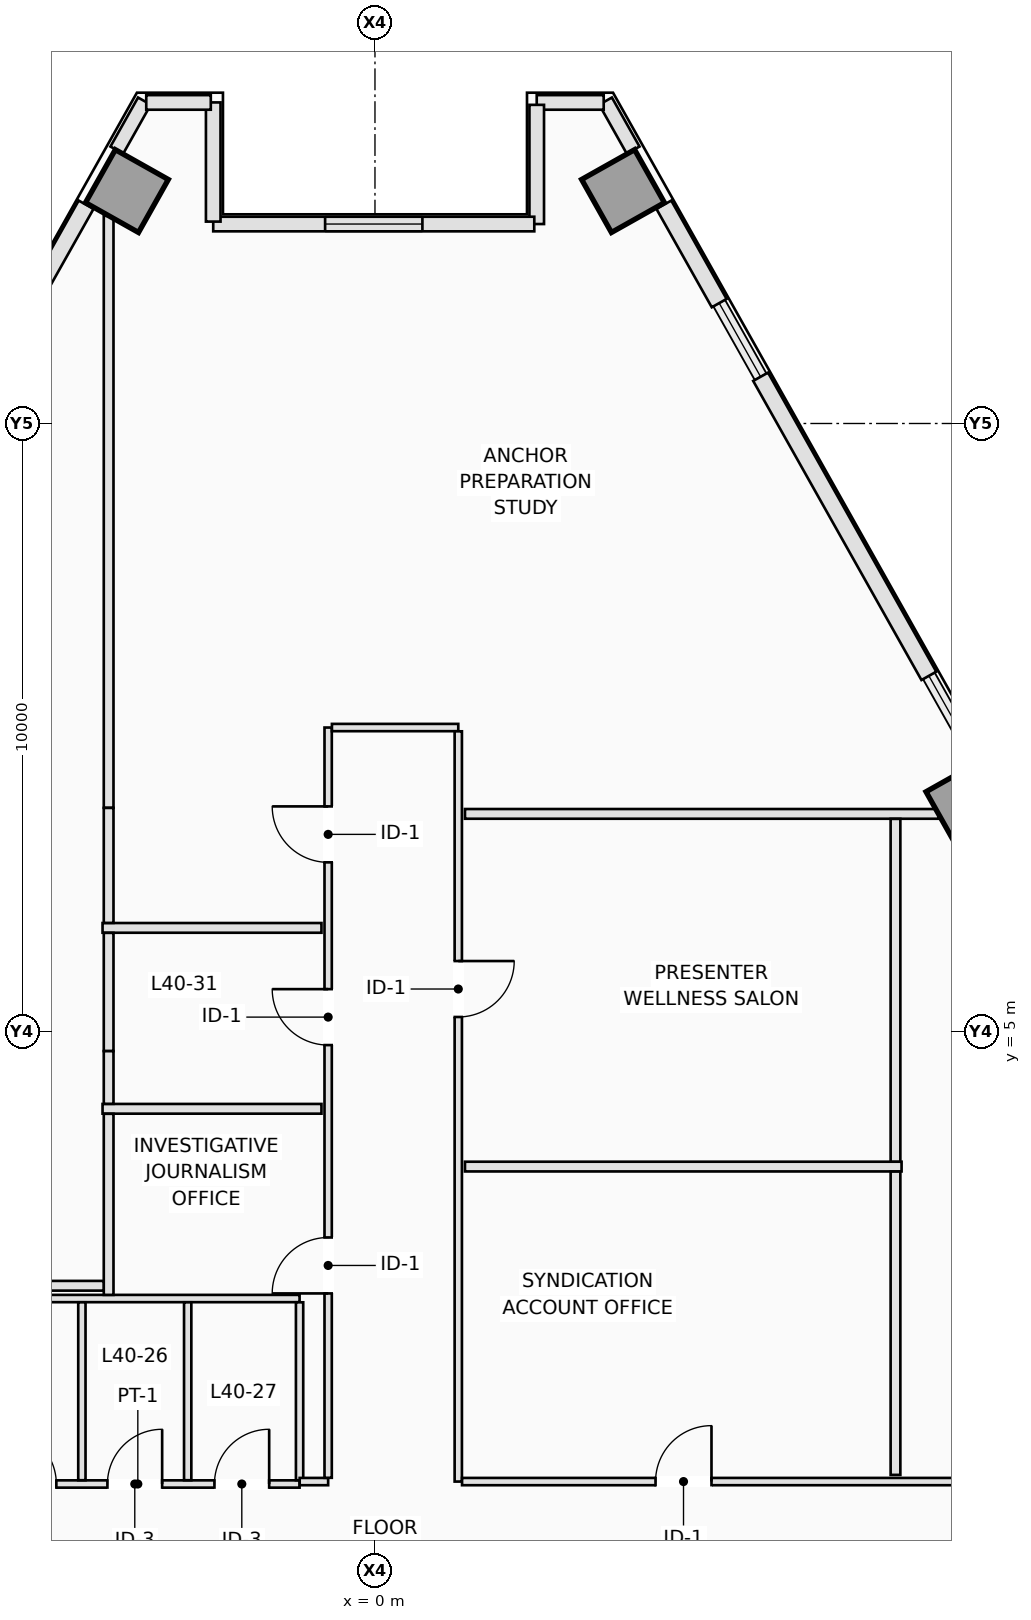
"""IFC4 building model, lengths in metres.
Left out: names, types, materials, properties, quantities, classifications, styles, units other than length and angle.
Written with IfcOpenShell. Run it as: python <this file> out.ifc"""

import sys

from ifc_helpers import new_model, si_unit, direction, frame, frame_2d, origin, origin_2d, place, context, subcontext, project, spatial, rectangle, extrude, element, fill, save


model = new_model("IFC4")
c1 = context("Model", 3, precision=1e-05, world=origin(), true_north=direction((0.0, 1.0)))
c2 = subcontext(c1, "Body", "Model", "MODEL_VIEW")
j1 = project(units=[si_unit("LENGTHUNIT", "METRE"), si_unit("PLANEANGLEUNIT", "RADIAN")], contexts=[c1])
p1 = place(None, origin())
s1 = spatial("IfcSite", under=j1, at=p1, CompositionType="ELEMENT")
p2 = place(p1, origin())
s2 = spatial("IfcBuilding", under=s1, at=p2, CompositionType="ELEMENT")
p3 = place(p2, frame((0.0, 0.0, 147.5)))
s3 = spatial("IfcBuildingStorey", under=s2, at=p3, CompositionType="ELEMENT", Elevation=147.5)
for number, where, z_axis, x_axis in (
    (1, (9.743, 8.753, 0.0), (0.0, 0.0, 1.0), (0.872, 0.49, 0.0)),
    (2, (4.079, 18.822, 0.0), (0.0, 0.0, 1.0), (0.872, 0.49, 0.0)),
    (3, (-4.079, 18.822, 0.0), (0.0, 0.0, 1.0), (-0.872, 0.49, 0.0)),
):
    element("IfcColumn", number, at=place(p3, frame(where, z_axis=z_axis, x_axis=x_axis)), inside=s3, PredefinedType="COLUMN", context=c2, shape_type="SweptSolid", body=[
        extrude(rectangle(XDim=1.0, YDim=1.0, at=origin_2d()), origin(), (0.0, 0.0, 1.0), 3.5),
    ])
p4 = place(p3, frame((3.792, 20.302, 0.0), z_axis=(0.0, 0.0, 1.0), x_axis=(0.490048346303, -0.871695255399, 0.0)))
e4 = element("IfcWall", 4, at=p4, inside=s3, PredefinedType="STANDARD", context=c2, shape_type="SweptSolid", body=[
    extrude(rectangle(XDim=0.926, YDim=0.24, at=frame_2d((0.463, 0.0))), origin(), (0.0, 0.0, 1.0), 3.25),
])
p5 = place(p3, frame((4.751, 18.597, 0.0), z_axis=(0.0, 0.0, 1.0), x_axis=(0.490248749158, -0.871582562899, 0.0)))
e5 = element("IfcWall", 5, at=p5, inside=s3, PredefinedType="STANDARD", context=c2, shape_type="SweptSolid", body=[
    extrude(rectangle(XDim=1.856, YDim=0.28, at=frame_2d((0.928, 0.0))), origin(), (0.0, 0.0, 1.0), 3.25),
])
p6 = place(p3, frame((6.342, 15.768, 0.0), z_axis=(0.0, 0.0, 1.0), x_axis=(0.490289995219, -0.871559361483, 0.0)))
e6 = element("IfcWall", 6, at=p6, inside=s3, PredefinedType="STANDARD", context=c2, shape_type="SweptSolid", body=[
    extrude(rectangle(XDim=5.643, YDim=0.28, at=frame_2d((2.822, 0.0))), origin(), (0.0, 0.0, 1.0), 3.25),
])
p7 = place(p3, frame((-4.246, 19.495, 0.0), z_axis=(0.0, 0.0, 1.0), x_axis=(0.490048346303, 0.871695255399, 0.0)))
e7 = element("IfcWall", 7, at=p7, inside=s3, PredefinedType="STANDARD", context=c2, shape_type="SweptSolid", body=[
    extrude(rectangle(XDim=0.926, YDim=0.24, at=frame_2d((0.463, 0.0))), origin(), (0.0, 0.0, 1.0), 3.25),
])
p8 = place(p3, frame((-5.661, 16.98, 0.0), z_axis=(0.0, 0.0, 1.0), x_axis=(0.490248749158, 0.871582562899, 0.0)))
e8 = element("IfcWall", 8, at=p8, inside=s3, PredefinedType="STANDARD", context=c2, shape_type="SweptSolid", body=[
    extrude(rectangle(XDim=1.856, YDim=0.28, at=frame_2d((0.928, 0.0))), origin(), (0.0, 0.0, 1.0), 3.25),
])
p9 = place(p3, frame((3.761, 20.28, 0.0), z_axis=(0.0, 0.0, 1.0), x_axis=(-1.0, 0.0, 0.0)))
e9 = element("IfcWall", 9, at=p9, inside=s3, PredefinedType="STANDARD", context=c2, shape_type="SweptSolid", body=[
    extrude(rectangle(XDim=1.102, YDim=0.24, at=frame_2d((0.551, 0.0))), origin(), (0.0, 0.0, 1.0), 3.25),
])
p10 = place(p3, frame((2.66, 20.24, 0.0), z_axis=(0.0, 0.0, 1.0), x_axis=(0.0, -1.0, 0.0)))
e10 = element("IfcWall", 10, at=p10, inside=s3, PredefinedType="STANDARD", context=c2, shape_type="SweptSolid", body=[
    extrude(rectangle(XDim=1.96, YDim=0.24, at=frame_2d((0.98, 0.0))), origin(), (0.0, 0.0, 1.0), 3.25),
])
p11 = place(p3, frame((2.62, 18.28, 0.0), z_axis=(0.0, 0.0, 1.0), x_axis=(-1.0, 0.0, 0.0)))
e11 = element("IfcWall", 11, at=p11, inside=s3, PredefinedType="STANDARD", context=c2, shape_type="SweptSolid", body=[
    extrude(rectangle(XDim=5.28, YDim=0.24, at=frame_2d((2.64, 0.0))), origin(), (0.0, 0.0, 1.0), 3.25),
])
p12 = place(p11, frame((1.84, 0.0, 0.9)))
e12 = element("IfcOpeningElement", 12, at=p12, cuts=e11, PredefinedType="OPENING", context=c2, shape_type="SweptSolid", body=[
    extrude(rectangle(XDim=1.6, YDim=2.1, at=frame_2d((0.8, 1.05))), frame((0.0, 0.13, 0.0), z_axis=(0.0, -1.0, 0.0), x_axis=(1.0, 0.0, 0.0)), (0.0, 0.0, 1.0), 0.26),
])
p13 = place(p3, frame((-2.66, 18.32, 0.0), z_axis=(0.0, 0.0, 1.0), x_axis=(0.0, 1.0, 0.0)))
e13 = element("IfcWall", 13, at=p13, inside=s3, PredefinedType="STANDARD", context=c2, shape_type="SweptSolid", body=[
    extrude(rectangle(XDim=1.96, YDim=0.24, at=frame_2d((0.98, 0.0))), origin(), (0.0, 0.0, 1.0), 3.25),
])
p14 = place(p3, frame((-2.7, 20.28, 0.0), z_axis=(0.0, 0.0, 1.0), x_axis=(-1.0, 0.0, 0.0)))
e14 = element("IfcWall", 14, at=p14, inside=s3, PredefinedType="STANDARD", context=c2, shape_type="SweptSolid", body=[
    extrude(rectangle(XDim=1.062, YDim=0.24, at=frame_2d((0.531, 0.0))), origin(), (0.0, 0.0, 1.0), 3.25),
])
p15 = place(p3, frame((-6.56, -2.44, 0.0), z_axis=(0.0, 0.0, 1.0), x_axis=(1.0, 0.0, 0.0)))
e15 = element("IfcWall", 15, at=p15, inside=s3, PredefinedType="PARTITIONING", context=c2, shape_type="SweptSolid", body=[
    extrude(rectangle(XDim=5.32, YDim=0.12, at=frame_2d((2.66, 0.0))), origin(), (0.0, 0.0, 1.0), 2.891),
])
p16 = place(p15, frame((0.42, 0.0, 0.0)))
e16 = element("IfcOpeningElement", 16, at=p16, cuts=e15, PredefinedType="OPENING", context=c2, shape_type="SweptSolid", body=[
    extrude(rectangle(XDim=0.9, YDim=2.12, at=frame_2d((0.45, 1.06))), frame((0.0, 0.07, 0.0), z_axis=(0.0, -1.0, 0.0), x_axis=(1.0, 0.0, 0.0)), (0.0, 0.0, 1.0), 0.14),
])
p17 = place(p15, frame((2.16, 0.0, 0.0)))
e17 = element("IfcOpeningElement", 17, at=p17, cuts=e15, PredefinedType="OPENING", context=c2, shape_type="SweptSolid", body=[
    extrude(rectangle(XDim=0.9, YDim=2.12, at=frame_2d((0.45, 1.06))), frame((0.0, 0.07, 0.0), z_axis=(0.0, -1.0, 0.0), x_axis=(1.0, 0.0, 0.0)), (0.0, 0.0, 1.0), 0.14),
])
p18 = place(p15, frame((3.92, 0.0, 0.0)))
e18 = element("IfcOpeningElement", 18, at=p18, cuts=e15, PredefinedType="OPENING", context=c2, shape_type="SweptSolid", body=[
    extrude(rectangle(XDim=0.9, YDim=2.12, at=frame_2d((0.45, 1.06))), frame((0.0, 0.07, 0.0), z_axis=(0.0, -1.0, 0.0), x_axis=(1.0, 0.0, 0.0)), (0.0, 0.0, 1.0), 0.14),
])
p19 = place(p3, frame((-6.56, 0.61, 0.0), z_axis=(0.0, 0.0, 1.0), x_axis=(1.0, 0.0, 0.0)))
e19 = element("IfcWall", 19, at=p19, inside=s3, PredefinedType="PARTITIONING", context=c2, shape_type="SweptSolid", body=[
    extrude(rectangle(XDim=5.32, YDim=0.12, at=frame_2d((2.66, 0.0))), origin(), (0.0, 0.0, 1.0), 3.25),
])
for number, where, z_axis, x_axis in (
    (20, (-4.82, -2.378, 0.0), (0.0, 0.0, 1.0), (0.0, 1.0, 0.0)),
    (21, (-3.08, -2.378, 0.0), (0.0, 0.0, 1.0), (0.0, 1.0, 0.0)),
    (22, (-1.24, -2.378, 0.0), (0.0, 0.0, 1.0), (0.0, 1.0, 0.0)),
):
    element("IfcWall", number, at=place(p3, frame(where, z_axis=z_axis, x_axis=x_axis)), inside=s3, PredefinedType="PARTITIONING", context=c2, shape_type="SweptSolid", body=[
        extrude(rectangle(XDim=2.926, YDim=0.12, at=frame_2d((1.463, 0.0))), origin(), (0.0, 0.0, 1.0), 3.25),
    ])
p20 = place(p3, frame((-1.238, -2.4, 0.0), z_axis=(0.0, 0.0, 1.0), x_axis=(1.0, 0.0, 0.0)))
e23 = element("IfcWall", 23, at=p20, inside=s3, PredefinedType="PARTITIONING", context=c2, shape_type="SweptSolid", body=[
    extrude(rectangle(XDim=0.468, YDim=0.12, at=frame_2d((0.234, 0.0))), origin(), (0.0, 0.0, 1.0), 2.891),
])
p21 = place(p3, frame((-0.77, -2.338, 0.0), z_axis=(0.0, 0.0, 1.0), x_axis=(0.0, 1.0, 0.0)))
e24 = element("IfcWall", 24, at=p21, inside=s3, PredefinedType="PARTITIONING", context=c2, shape_type="SweptSolid", body=[
    extrude(rectangle(XDim=12.338, YDim=0.12, at=frame_2d((6.169, 0.0))), origin(), (0.0, 0.0, 1.0), 3.25),
])
p22 = place(p21, frame((10.121, 0.0, 0.0)))
e25 = element("IfcOpeningElement", 25, at=p22, cuts=e24, PredefinedType="OPENING", context=c2, shape_type="SweptSolid", body=[
    extrude(rectangle(XDim=0.92, YDim=2.12, at=frame_2d((0.46, 1.06))), frame((0.0, 0.07, 0.0), z_axis=(0.0, -1.0, 0.0), x_axis=(1.0, 0.0, 0.0)), (0.0, 0.0, 1.0), 0.14),
])
p23 = place(p21, frame((7.116, 0.0, 0.0)))
e26 = element("IfcOpeningElement", 26, at=p23, cuts=e24, PredefinedType="OPENING", context=c2, shape_type="SweptSolid", body=[
    extrude(rectangle(XDim=0.92, YDim=2.12, at=frame_2d((0.46, 1.06))), frame((0.0, 0.07, 0.0), z_axis=(0.0, -1.0, 0.0), x_axis=(1.0, 0.0, 0.0)), (0.0, 0.0, 1.0), 0.14),
])
p24 = place(p21, frame((3.032, 0.0, 0.0)))
e27 = element("IfcOpeningElement", 27, at=p24, cuts=e24, PredefinedType="OPENING", context=c2, shape_type="SweptSolid", body=[
    extrude(rectangle(XDim=0.92, YDim=2.12, at=frame_2d((0.46, 1.06))), frame((0.0, 0.07, 0.0), z_axis=(0.0, -1.0, 0.0), x_axis=(1.0, 0.0, 0.0)), (0.0, 0.0, 1.0), 0.14),
])
p25 = place(p3, frame((-0.708, 10.0, 0.0), z_axis=(0.0, 0.0, 1.0), x_axis=(1.0, 0.0, 0.0)))
e28 = element("IfcWall", 28, at=p25, inside=s3, PredefinedType="PARTITIONING", context=c2, shape_type="SweptSolid", body=[
    extrude(rectangle(XDim=2.078, YDim=0.12, at=frame_2d((1.039, 0.0))), origin(), (0.0, 0.0, 1.0), 3.25),
])
p26 = place(p3, frame((1.37, 9.938, 0.0), z_axis=(0.0, 0.0, 1.0), x_axis=(0.0, -1.0, 0.0)))
e29 = element("IfcWall", 29, at=p26, inside=s3, PredefinedType="PARTITIONING", context=c2, shape_type="SweptSolid", body=[
    extrude(rectangle(XDim=12.338, YDim=0.12, at=frame_2d((6.169, 0.0))), origin(), (0.0, 0.0, 1.0), 3.25),
])
p27 = place(p26, frame((3.778, 0.0, 0.0)))
e30 = element("IfcOpeningElement", 30, at=p27, cuts=e29, PredefinedType="OPENING", context=c2, shape_type="SweptSolid", body=[
    extrude(rectangle(XDim=0.92, YDim=2.12, at=frame_2d((0.46, 1.06))), frame((0.0, 0.07, 0.0), z_axis=(0.0, -1.0, 0.0), x_axis=(1.0, 0.0, 0.0)), (0.0, 0.0, 1.0), 0.14),
])
p28 = place(p3, frame((1.432, -2.4, 0.0), z_axis=(0.0, 0.0, 1.0), x_axis=(1.0, 0.0, 0.0)))
e31 = element("IfcWall", 31, at=p28, inside=s3, PredefinedType="PARTITIONING", context=c2, shape_type="SweptSolid", body=[
    extrude(rectangle(XDim=10.978, YDim=0.12, at=frame_2d((5.489, 0.0))), origin(), (0.0, 0.0, 1.0), 2.891),
])
p29 = place(p28, frame((3.182, 0.0, 0.0)))
e32 = element("IfcOpeningElement", 32, at=p29, cuts=e31, PredefinedType="OPENING", context=c2, shape_type="SweptSolid", body=[
    extrude(rectangle(XDim=0.92, YDim=2.12, at=frame_2d((0.46, 1.06))), frame((0.0, 0.07, 0.0), z_axis=(0.0, -1.0, 0.0), x_axis=(1.0, 0.0, 0.0)), (0.0, 0.0, 1.0), 0.14),
])
p30 = place(p28, frame((8.464, 0.0, 0.0)))
e33 = element("IfcOpeningElement", 33, at=p30, cuts=e31, PredefinedType="OPENING", context=c2, shape_type="SweptSolid", body=[
    extrude(rectangle(XDim=0.92, YDim=2.12, at=frame_2d((0.46, 1.06))), frame((0.0, 0.07, 0.0), z_axis=(0.0, -1.0, 0.0), x_axis=(1.0, 0.0, 0.0)), (0.0, 0.0, 1.0), 0.14),
])
p31 = place(p3, frame((9.264, 8.58, 0.0), z_axis=(0.0, 0.0, 1.0), x_axis=(-1.0, 0.0, 0.0)))
e34 = element("IfcWall", 34, at=p31, inside=s3, PredefinedType="PARTITIONING", context=c2, shape_type="SweptSolid", body=[
    extrude(rectangle(XDim=7.784, YDim=0.16, at=frame_2d((3.892, 0.0))), origin(), (0.0, 0.0, 1.0), 3.25),
])
p32 = place(p3, frame((-0.88, 6.705, 0.0), z_axis=(0.0, 0.0, 1.0), x_axis=(-1.0, 0.0, 0.0)))
e35 = element("IfcWall", 35, at=p32, inside=s3, PredefinedType="PARTITIONING", context=c2, shape_type="SweptSolid", body=[
    extrude(rectangle(XDim=3.6, YDim=0.16, at=frame_2d((1.8, 0.0))), origin(), (0.0, 0.0, 1.0), 2.891),
])
p33 = place(p3, frame((-4.38, 8.68, 0.0), z_axis=(0.0, 0.0, 1.0), x_axis=(0.0, 1.0, 0.0)))
e36 = element("IfcWall", 36, at=p33, inside=s3, PredefinedType="PARTITIONING", context=c2, shape_type="SweptSolid", body=[
    extrude(rectangle(XDim=9.735, YDim=0.16, at=frame_2d((4.868, 0.0))), origin(), (0.0, 0.0, 1.0), 3.25),
])
p34 = place(p3, frame((-4.38, 6.787, 0.0), z_axis=(0.0, 0.0, 1.0), x_axis=(0.0, 1.0, 0.0)))
e37 = element("IfcWall", 37, at=p34, inside=s3, PredefinedType="PARTITIONING", context=c2, shape_type="SweptSolid", body=[
    extrude(rectangle(XDim=1.891, YDim=0.16, at=frame_2d((0.945, 0.0))), origin(), (0.0, 0.0, 1.0), 3.25),
])
p35 = place(p3, frame((8.66, 2.78, 0.0), z_axis=(0.0, 0.0, 1.0), x_axis=(-1.0, 0.0, 0.0)))
e38 = element("IfcWall", 38, at=p35, inside=s3, PredefinedType="PARTITIONING", context=c2, shape_type="SweptSolid", body=[
    extrude(rectangle(XDim=7.18, YDim=0.16, at=frame_2d((3.59, 0.0))), origin(), (0.0, 0.0, 1.0), 3.25),
])
p36 = place(p3, frame((8.56, 8.498, 0.0), z_axis=(0.0, 0.0, 1.0), x_axis=(0.0, -1.0, 0.0)))
e39 = element("IfcWall", 39, at=p36, inside=s3, PredefinedType="PARTITIONING", context=c2, shape_type="SweptSolid", body=[
    extrude(rectangle(XDim=5.636, YDim=0.16, at=frame_2d((2.818, 0.0))), origin(), (0.0, 0.0, 1.0), 3.25),
])
p37 = place(p3, frame((-0.88, 3.73, 0.0), z_axis=(0.0, 0.0, 1.0), x_axis=(-1.0, 0.0, 0.0)))
e40 = element("IfcWall", 40, at=p37, inside=s3, PredefinedType="PARTITIONING", context=c2, shape_type="SweptSolid", body=[
    extrude(rectangle(XDim=3.6, YDim=0.16, at=frame_2d((1.8, 0.0))), origin(), (0.0, 0.0, 1.0), 3.25),
])
p38 = place(p3, frame((-4.38, 4.68, 0.0), z_axis=(0.0, 0.0, 1.0), x_axis=(0.0, 1.0, 0.0)))
e41 = element("IfcWall", 41, at=p38, inside=s3, PredefinedType="PARTITIONING", context=c2, shape_type="SweptSolid", body=[
    extrude(rectangle(XDim=1.943, YDim=0.16, at=frame_2d((0.972, 0.0))), origin(), (0.0, 0.0, 1.0), 3.25),
])
p39 = place(p3, frame((-4.38, 3.812, 0.0), z_axis=(0.0, 0.0, 1.0), x_axis=(0.0, 1.0, 0.0)))
e42 = element("IfcWall", 42, at=p39, inside=s3, PredefinedType="PARTITIONING", context=c2, shape_type="SweptSolid", body=[
    extrude(rectangle(XDim=0.866, YDim=0.16, at=frame_2d((0.433, 0.0))), origin(), (0.0, 0.0, 1.0), 3.25),
])
p40 = place(p3, frame((-4.38, 0.67, 0.0), z_axis=(0.0, 0.0, 1.0), x_axis=(0.0, 1.0, 0.0)))
e43 = element("IfcWall", 43, at=p40, inside=s3, PredefinedType="PARTITIONING", context=c2, shape_type="SweptSolid", body=[
    extrude(rectangle(XDim=2.978, YDim=0.16, at=frame_2d((1.489, 0.0))), origin(), (0.0, 0.0, 1.0), 3.25),
])
p41 = place(p3, frame((8.56, 2.698, 0.0), z_axis=(0.0, 0.0, 1.0), x_axis=(0.0, -1.0, 0.0)))
e44 = element("IfcWall", 44, at=p41, inside=s3, PredefinedType="PARTITIONING", context=c2, shape_type="SweptSolid", body=[
    extrude(rectangle(XDim=4.988, YDim=0.16, at=frame_2d((2.494, 0.0))), origin(), (0.0, 0.0, 1.0), 3.25),
])
p42 = place(p3, frame((-10.598, 0.82, 0.0), z_axis=(0.0, 0.0, 1.0), x_axis=(1.0, 0.0, 0.0)))
e45 = element("IfcWall", 45, at=p42, inside=s3, PredefinedType="PARTITIONING", context=c2, shape_type="SweptSolid", body=[
    extrude(rectangle(XDim=6.136, YDim=0.16, at=frame_2d((3.068, 0.0))), origin(), (0.0, 0.0, 1.0), 3.25),
])
p43 = place(p12, origin())
e46 = element("IfcWindow", 46, at=p43, inside=s3, PartitioningType="SINGLE_PANEL", PredefinedType="WINDOW", context=c2, shape_type="SweptSolid", body=[
    extrude(rectangle(XDim=1.6, YDim=2.1, at=frame_2d((0.8, 1.05))), frame((0.0, 0.03, 0.0), z_axis=(0.0, -1.0, 0.0), x_axis=(1.0, 0.0, 0.0)), (0.0, 0.0, 1.0), 0.06),
])
fill(e12, e46)
p44 = place(p16, origin())
e47 = element("IfcDoor", 47, at=p44, inside=s3, OperationType="SINGLE_SWING_LEFT", PredefinedType="DOOR", context=c2, shape_type="SweptSolid", body=[
    extrude(rectangle(XDim=0.9, YDim=2.12, at=frame_2d((0.45, 1.06))), frame((0.0, 0.025, 0.0), z_axis=(0.0, -1.0, 0.0), x_axis=(1.0, 0.0, 0.0)), (0.0, 0.0, 1.0), 0.05),
])
fill(e16, e47)
p45 = place(p17, origin())
e48 = element("IfcDoor", 48, at=p45, inside=s3, OperationType="SINGLE_SWING_RIGHT", PredefinedType="DOOR", context=c2, shape_type="SweptSolid", body=[
    extrude(rectangle(XDim=0.9, YDim=2.12, at=frame_2d((0.45, 1.06))), frame((0.0, 0.025, 0.0), z_axis=(0.0, -1.0, 0.0), x_axis=(1.0, 0.0, 0.0)), (0.0, 0.0, 1.0), 0.05),
])
fill(e17, e48)
p46 = place(p18, origin())
e49 = element("IfcDoor", 49, at=p46, inside=s3, OperationType="SINGLE_SWING_RIGHT", PredefinedType="DOOR", context=c2, shape_type="SweptSolid", body=[
    extrude(rectangle(XDim=0.9, YDim=2.12, at=frame_2d((0.45, 1.06))), frame((0.0, 0.025, 0.0), z_axis=(0.0, -1.0, 0.0), x_axis=(1.0, 0.0, 0.0)), (0.0, 0.0, 1.0), 0.05),
])
fill(e18, e49)
p47 = place(p22, origin())
e50 = element("IfcDoor", 50, at=p47, inside=s3, OperationType="SINGLE_SWING_RIGHT", PredefinedType="DOOR", context=c2, shape_type="SweptSolid", body=[
    extrude(rectangle(XDim=0.92, YDim=2.12, at=frame_2d((0.46, 1.06))), frame((0.0, 0.025, 0.0), z_axis=(0.0, -1.0, 0.0), x_axis=(1.0, 0.0, 0.0)), (0.0, 0.0, 1.0), 0.05),
])
fill(e25, e50)
p48 = place(p27, origin())
e51 = element("IfcDoor", 51, at=p48, inside=s3, OperationType="SINGLE_SWING_LEFT", PredefinedType="DOOR", context=c2, shape_type="SweptSolid", body=[
    extrude(rectangle(XDim=0.92, YDim=2.12, at=frame_2d((0.46, 1.06))), frame((0.0, 0.025, 0.0), z_axis=(0.0, -1.0, 0.0), x_axis=(1.0, 0.0, 0.0)), (0.0, 0.0, 1.0), 0.05),
])
fill(e30, e51)
p49 = place(p23, origin())
e52 = element("IfcDoor", 52, at=p49, inside=s3, OperationType="SINGLE_SWING_RIGHT", PredefinedType="DOOR", context=c2, shape_type="SweptSolid", body=[
    extrude(rectangle(XDim=0.92, YDim=2.12, at=frame_2d((0.46, 1.06))), frame((0.0, 0.025, 0.0), z_axis=(0.0, -1.0, 0.0), x_axis=(1.0, 0.0, 0.0)), (0.0, 0.0, 1.0), 0.05),
])
fill(e26, e52)
p50 = place(p24, origin())
e53 = element("IfcDoor", 53, at=p50, inside=s3, OperationType="SINGLE_SWING_LEFT", PredefinedType="DOOR", context=c2, shape_type="SweptSolid", body=[
    extrude(rectangle(XDim=0.92, YDim=2.12, at=frame_2d((0.46, 1.06))), frame((0.0, 0.025, 0.0), z_axis=(0.0, -1.0, 0.0), x_axis=(1.0, 0.0, 0.0)), (0.0, 0.0, 1.0), 0.05),
])
fill(e27, e53)
p51 = place(p29, origin())
e54 = element("IfcDoor", 54, at=p51, inside=s3, OperationType="SINGLE_SWING_RIGHT", PredefinedType="DOOR", context=c2, shape_type="SweptSolid", body=[
    extrude(rectangle(XDim=0.92, YDim=2.12, at=frame_2d((0.46, 1.06))), frame((0.0, 0.025, 0.0), z_axis=(0.0, -1.0, 0.0), x_axis=(1.0, 0.0, 0.0)), (0.0, 0.0, 1.0), 0.05),
])
fill(e32, e54)
save(model, sys.argv[1])
